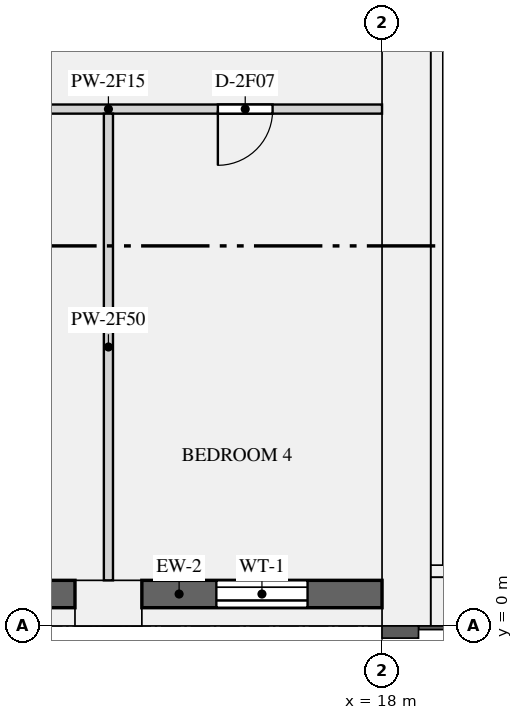
"""IFC4 building model, lengths in metres.
Left out: names, types, materials, properties, quantities, classifications, styles, units other than length and angle.
Written with IfcOpenShell. Run it as: python <this file> out.ifc"""

import sys

from ifc_helpers import new_model, si_unit, direction, frame, frame_2d, origin, origin_2d, place, context, subcontext, project, spatial, rectangle, extrude, element, fill, save


model = new_model("IFC4")
c1 = context("Model", 3, precision=1e-05, world=origin(), true_north=direction((0.0, 1.0)))
c2 = subcontext(c1, "Body", "Model", "MODEL_VIEW")
j1 = project(units=[si_unit("LENGTHUNIT", "METRE"), si_unit("PLANEANGLEUNIT", "RADIAN")], contexts=[c1])
p1 = place(None, origin())
s1 = spatial("IfcSite", under=j1, at=p1, CompositionType="ELEMENT")
p2 = place(p1, origin())
s2 = spatial("IfcBuilding", under=s1, at=p2, CompositionType="ELEMENT")
p3 = place(p2, frame((0.0, 0.0, 124.5)))
s3 = spatial("IfcBuildingStorey", under=s2, at=p3, CompositionType="ELEMENT", Elevation=124.5)
p4 = place(p3, frame((13.5, 0.375, 0.0), z_axis=(0.0, 0.0, 1.0), x_axis=(1.0, 0.0, 0.0)))
e1 = element("IfcColumn", 1, at=p4, inside=s3, PredefinedType="USERDEFINED", context=c2, shape_type="SweptSolid", body=[
    extrude(rectangle(XDim=1.1, YDim=0.75, at=origin_2d()), origin(), (0.0, 0.0, 1.0), 3.15),
])
p5 = place(p3, frame((18.4, 0.0, 0.0), z_axis=(0.0, 0.0, 1.0), x_axis=(0.0, 1.0, 0.0)))
e2 = element("IfcWall", 2, at=p5, inside=s3, PredefinedType="SHEAR", context=c2, shape_type="SweptSolid", body=[
    extrude(rectangle(XDim=12.5, YDim=0.8, at=frame_2d((6.25, 0.0))), origin(), (0.0, 0.0, 1.0), 3.15),
])
p6 = place(p3, frame((18.8, 0.4, 0.0), z_axis=(0.0, 0.0, 1.0), x_axis=(1.0, 0.0, 0.0)))
e3 = element("IfcWall", 3, at=p6, inside=s3, PredefinedType="SHEAR", context=c2, shape_type="SweptSolid", body=[
    extrude(rectangle(XDim=34.4, YDim=0.8, at=frame_2d((17.2, 0.0))), origin(), (0.0, 0.0, 1.0), 3.15),
])
p7 = place(p3, frame((18.9, 1.0, 0.0), z_axis=(0.0, 0.0, 1.0), x_axis=(0.0, 1.0, 0.0)))
e4 = element("IfcWall", 4, at=p7, inside=s3, PredefinedType="SHEAR", context=c2, shape_type="SweptSolid", body=[
    extrude(rectangle(XDim=10.9, YDim=0.2, at=frame_2d((5.45, 0.0))), origin(), (0.0, 0.0, 1.0), 3.15),
])
p8 = place(p3, frame((18.8, 0.9, 0.0), z_axis=(0.0, 0.0, 1.0), x_axis=(1.0, 0.0, 0.0)))
e5 = element("IfcWall", 5, at=p8, inside=s3, PredefinedType="SHEAR", context=c2, shape_type="SweptSolid", body=[
    extrude(rectangle(XDim=34.4, YDim=0.2, at=frame_2d((17.2, 0.0))), origin(), (0.0, 0.0, 1.0), 3.15),
])
p9 = place(p3, frame((19.0, 3.4, 0.0), z_axis=(0.0, 0.0, 1.0), x_axis=(1.0, 0.0, 0.0)))
e6 = element("IfcWall", 6, at=p9, inside=s3, PredefinedType="SHEAR", context=c2, shape_type="SweptSolid", body=[
    extrude(rectangle(XDim=2.55, YDim=0.3, at=frame_2d((1.275, 0.0))), origin(), (0.0, 0.0, 1.0), 3.15),
])
p10 = place(p9, frame((0.675, 0.0, 0.0)))
e7 = element("IfcOpeningElement", 7, at=p10, cuts=e6, PredefinedType="OPENING", context=c2, shape_type="SweptSolid", body=[
    extrude(rectangle(XDim=1.2, YDim=2.1, at=frame_2d((0.6, 1.05))), frame((0.0, 0.16, 0.0), z_axis=(0.0, -1.0, 0.0), x_axis=(1.0, 0.0, 0.0)), (0.0, 0.0, 1.0), 0.32),
])
p11 = place(p3, frame((10.1, 0.525, 0.9), z_axis=(0.0, 0.0, 1.0), x_axis=(1.0, 0.0, 0.0)))
e8 = element("IfcWall", 8, at=p11, inside=s3, PredefinedType="SOLIDWALL", context=c2, shape_type="SweptSolid", body=[
    extrude(rectangle(XDim=2.85, YDim=0.45, at=frame_2d((1.425, 0.0))), origin(), (0.0, 0.0, 1.0), 1.93),
])
p12 = place(p11, frame((0.675, 0.0, 0.15)))
e9 = element("IfcOpeningElement", 9, at=p12, cuts=e8, PredefinedType="OPENING", context=c2, shape_type="SweptSolid", body=[
    extrude(rectangle(XDim=1.5, YDim=1.5, at=frame_2d((0.75, 0.75))), frame((0.0, 0.235, 0.0), z_axis=(0.0, -1.0, 0.0), x_axis=(1.0, 0.0, 0.0)), (0.0, 0.0, 1.0), 0.47),
])
p13 = place(p3, frame((14.05, 0.525, 0.9), z_axis=(0.0, 0.0, 1.0), x_axis=(1.0, 0.0, 0.0)))
e10 = element("IfcWall", 10, at=p13, inside=s3, PredefinedType="SOLIDWALL", context=c2, shape_type="SweptSolid", body=[
    extrude(rectangle(XDim=3.95, YDim=0.45, at=frame_2d((1.975, 0.0))), origin(), (0.0, 0.0, 1.0), 1.93),
])
p14 = place(p13, frame((1.225, 0.0, 0.15)))
e11 = element("IfcOpeningElement", 11, at=p14, cuts=e10, PredefinedType="OPENING", context=c2, shape_type="SweptSolid", body=[
    extrude(rectangle(XDim=1.5, YDim=1.5, at=frame_2d((0.75, 0.75))), frame((0.0, 0.235, 0.0), z_axis=(0.0, -1.0, 0.0), x_axis=(1.0, 0.0, 0.0)), (0.0, 0.0, 1.0), 0.47),
])
p15 = place(p3, frame((9.075, 8.5, 0.0), z_axis=(0.0, 0.0, 1.0), x_axis=(1.0, 0.0, 0.0)))
e12 = element("IfcWall", 12, at=p15, inside=s3, PredefinedType="PARTITIONING", context=c2, shape_type="SweptSolid", body=[
    extrude(rectangle(XDim=8.925, YDim=0.15, at=frame_2d((4.462, 0.0))), origin(), (0.0, 0.0, 1.0), 2.83),
])
p16 = place(p15, frame((1.725, 0.0, 0.0)))
e13 = element("IfcOpeningElement", 13, at=p16, cuts=e12, PredefinedType="OPENING", context=c2, shape_type="SweptSolid", body=[
    extrude(rectangle(XDim=0.9, YDim=2.1, at=frame_2d((0.45, 1.05))), frame((0.0, 0.085, 0.0), z_axis=(0.0, -1.0, 0.0), x_axis=(1.0, 0.0, 0.0)), (0.0, 0.0, 1.0), 0.17),
])
p17 = place(p15, frame((6.225, 0.0, 0.0)))
e14 = element("IfcOpeningElement", 14, at=p17, cuts=e12, PredefinedType="OPENING", context=c2, shape_type="SweptSolid", body=[
    extrude(rectangle(XDim=0.9, YDim=2.1, at=frame_2d((0.45, 1.05))), frame((0.0, 0.085, 0.0), z_axis=(0.0, -1.0, 0.0), x_axis=(1.0, 0.0, 0.0)), (0.0, 0.0, 1.0), 0.17),
])
p18 = place(p3, frame((13.5, 0.75, 0.0), z_axis=(0.0, 0.0, 1.0), x_axis=(0.0, 1.0, 0.0)))
e15 = element("IfcWall", 15, at=p18, inside=s3, PredefinedType="PARTITIONING", context=c2, shape_type="SweptSolid", body=[
    extrude(rectangle(XDim=7.675, YDim=0.15, at=frame_2d((3.837, 0.0))), origin(), (0.0, 0.0, 1.0), 2.83),
])
p19 = place(p14, origin())
e16 = element("IfcWindow", 16, at=p19, inside=s3, PartitioningType="SINGLE_PANEL", PredefinedType="WINDOW", context=c2, shape_type="SweptSolid", body=[
    extrude(rectangle(XDim=1.5, YDim=1.5, at=frame_2d((0.75, 0.75))), frame((0.0, -0.065, 0.0), z_axis=(0.0, -1.0, 0.0), x_axis=(1.0, 0.0, 0.0)), (0.0, 0.0, 1.0), 0.06),
])
fill(e11, e16)
p20 = place(p17, frame((0.9, 0.0, 0.0), z_axis=(0.0, 0.0, 1.0), x_axis=(-1.0, 0.0, 0.0)))
e17 = element("IfcDoor", 17, at=p20, inside=s3, OperationType="SINGLE_SWING_RIGHT", PredefinedType="DOOR", context=c2, shape_type="SweptSolid", body=[
    extrude(rectangle(XDim=0.9, YDim=2.1, at=frame_2d((0.45, 1.05))), frame((0.0, 0.025, 0.0), z_axis=(0.0, -1.0, 0.0), x_axis=(1.0, 0.0, 0.0)), (0.0, 0.0, 1.0), 0.05),
])
fill(e14, e17)
save(model, sys.argv[1])
